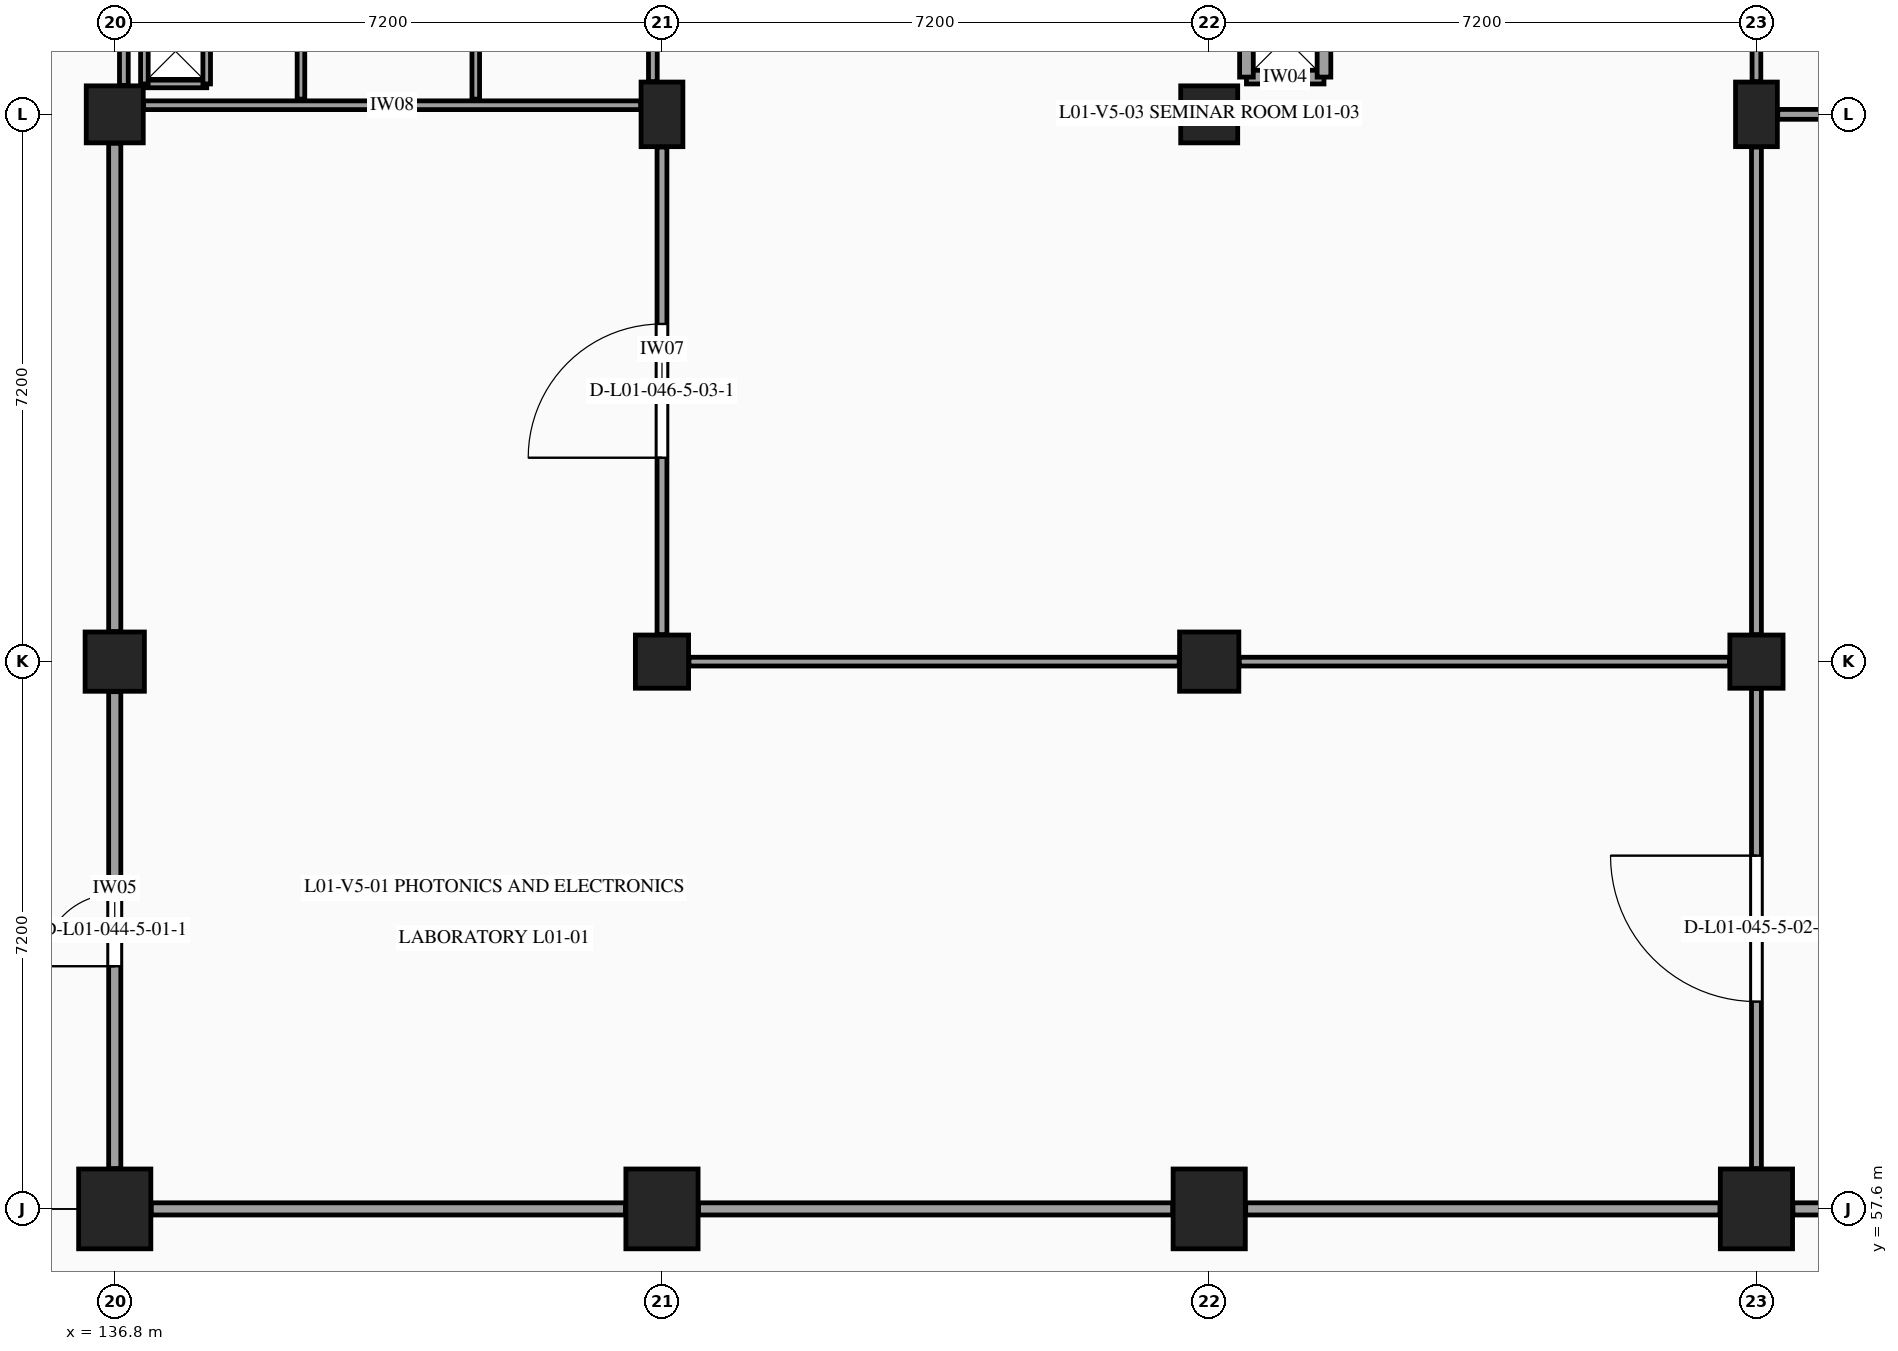
"""IFC4 building model, lengths in metres.
Left out: names, types, materials, properties, quantities, classifications, styles, units other than length and angle.
Written with IfcOpenShell. Run it as: python <this file> out.ifc"""

import sys

from ifc_helpers import new_model, si_unit, direction, frame, frame_2d, origin, origin_2d, place, context, subcontext, project, spatial, rectangle, extrude, element, fill, save


model = new_model("IFC4")
c1 = context("Model", 3, precision=1e-05, world=origin(), true_north=direction((0.0, 1.0)))
c2 = subcontext(c1, "Body", "Model", "MODEL_VIEW")
j1 = project(units=[si_unit("LENGTHUNIT", "METRE"), si_unit("PLANEANGLEUNIT", "RADIAN")], contexts=[c1])
p1 = place(None, origin())
s1 = spatial("IfcSite", under=j1, at=p1, CompositionType="ELEMENT")
p2 = place(p1, origin())
s2 = spatial("IfcBuilding", under=s1, at=p2, CompositionType="ELEMENT")
p3 = place(p2, frame((0.0, 0.0, 5.4)))
s3 = spatial("IfcBuildingStorey", under=s2, at=p3, CompositionType="ELEMENT", Elevation=5.4)
p4 = place(p3, frame((136.8, 57.6, 0.0), z_axis=(0.0, 0.0, 1.0), x_axis=(1.0, 0.0, 0.0)))
e1 = element("IfcColumn", 1, at=p4, inside=s3, PredefinedType="COLUMN", context=c2, shape_type="SweptSolid", body=[
    extrude(rectangle(XDim=0.95, YDim=1.05, at=origin_2d()), origin(), (0.0, 0.0, 1.0), 4.5),
])
p5 = place(p3, frame((136.8, 64.8, 0.0), z_axis=(0.0, 0.0, 1.0), x_axis=(1.0, 0.0, 0.0)))
e2 = element("IfcColumn", 2, at=p5, inside=s3, PredefinedType="COLUMN", context=c2, shape_type="SweptSolid", body=[
    extrude(rectangle(XDim=0.78, YDim=0.78, at=origin_2d()), origin(), (0.0, 0.0, 1.0), 4.5),
])
p6 = place(p3, frame((136.8, 72.0, 0.0), z_axis=(0.0, 0.0, 1.0), x_axis=(1.0, 0.0, 0.0)))
e3 = element("IfcColumn", 3, at=p6, inside=s3, PredefinedType="COLUMN", context=c2, shape_type="SweptSolid", body=[
    extrude(rectangle(XDim=0.75, YDim=0.75, at=origin_2d()), origin(), (0.0, 0.0, 1.0), 4.5),
])
p7 = place(p3, frame((144.0, 57.6, 0.0), z_axis=(0.0, 0.0, 1.0), x_axis=(1.0, 0.0, 0.0)))
e4 = element("IfcColumn", 4, at=p7, inside=s3, PredefinedType="COLUMN", context=c2, shape_type="SweptSolid", body=[
    extrude(rectangle(XDim=0.95, YDim=1.05, at=origin_2d()), origin(), (0.0, 0.0, 1.0), 4.5),
])
p8 = place(p3, frame((144.0, 64.8, 0.0), z_axis=(0.0, 0.0, 1.0), x_axis=(1.0, 0.0, 0.0)))
e5 = element("IfcColumn", 5, at=p8, inside=s3, PredefinedType="COLUMN", context=c2, shape_type="SweptSolid", body=[
    extrude(rectangle(XDim=0.7, YDim=0.7, at=origin_2d()), origin(), (0.0, 0.0, 1.0), 4.5),
])
p9 = place(p3, frame((144.0, 72.0, 0.0), z_axis=(0.0, 0.0, 1.0), x_axis=(1.0, 0.0, 0.0)))
e6 = element("IfcColumn", 6, at=p9, inside=s3, PredefinedType="COLUMN", context=c2, shape_type="SweptSolid", body=[
    extrude(rectangle(XDim=0.55, YDim=0.85, at=origin_2d()), origin(), (0.0, 0.0, 1.0), 4.5),
])
p10 = place(p3, frame((151.2, 57.6, 0.0), z_axis=(0.0, 0.0, 1.0), x_axis=(1.0, 0.0, 0.0)))
e7 = element("IfcColumn", 7, at=p10, inside=s3, PredefinedType="COLUMN", context=c2, shape_type="SweptSolid", body=[
    extrude(rectangle(XDim=0.95, YDim=1.05, at=origin_2d()), origin(), (0.0, 0.0, 1.0), 4.5),
])
p11 = place(p3, frame((151.2, 64.8, 0.0), z_axis=(0.0, 0.0, 1.0), x_axis=(1.0, 0.0, 0.0)))
e8 = element("IfcColumn", 8, at=p11, inside=s3, PredefinedType="COLUMN", context=c2, shape_type="SweptSolid", body=[
    extrude(rectangle(XDim=0.78, YDim=0.78, at=origin_2d()), origin(), (0.0, 0.0, 1.0), 4.5),
])
p12 = place(p3, frame((151.2, 72.0, 0.0), z_axis=(0.0, 0.0, 1.0), x_axis=(1.0, 0.0, 0.0)))
e9 = element("IfcColumn", 9, at=p12, inside=s3, PredefinedType="COLUMN", context=c2, shape_type="SweptSolid", body=[
    extrude(rectangle(XDim=0.75, YDim=0.75, at=origin_2d()), origin(), (0.0, 0.0, 1.0), 4.5),
])
p13 = place(p3, frame((158.4, 57.6, 0.0), z_axis=(0.0, 0.0, 1.0), x_axis=(1.0, 0.0, 0.0)))
e10 = element("IfcColumn", 10, at=p13, inside=s3, PredefinedType="COLUMN", context=c2, shape_type="SweptSolid", body=[
    extrude(rectangle(XDim=0.95, YDim=1.05, at=origin_2d()), origin(), (0.0, 0.0, 1.0), 4.5),
])
p14 = place(p3, frame((158.4, 64.8, 0.0), z_axis=(0.0, 0.0, 1.0), x_axis=(1.0, 0.0, 0.0)))
e11 = element("IfcColumn", 11, at=p14, inside=s3, PredefinedType="COLUMN", context=c2, shape_type="SweptSolid", body=[
    extrude(rectangle(XDim=0.7, YDim=0.7, at=origin_2d()), origin(), (0.0, 0.0, 1.0), 4.5),
])
p15 = place(p3, frame((158.4, 72.0, 0.0), z_axis=(0.0, 0.0, 1.0), x_axis=(1.0, 0.0, 0.0)))
e12 = element("IfcColumn", 12, at=p15, inside=s3, PredefinedType="COLUMN", context=c2, shape_type="SweptSolid", body=[
    extrude(rectangle(XDim=0.55, YDim=0.85, at=origin_2d()), origin(), (0.0, 0.0, 1.0), 4.5),
])
p16 = place(p3, frame((137.18, 72.12, 0.0), z_axis=(0.0, 0.0, 1.0), x_axis=(1.0, 0.0, 0.0)))
e13 = element("IfcWall", 13, at=p16, inside=s3, PredefinedType="PARTITIONING", context=c2, shape_type="SweptSolid", body=[
    extrude(rectangle(XDim=6.54, YDim=0.115, at=frame_2d((3.27, 0.0))), origin(), (0.0, 0.0, 1.0), 3.43),
])
p17 = place(p3, frame((136.92, 72.38, 0.0), z_axis=(0.0, 0.0, 1.0), x_axis=(0.0, 1.0, 0.0)))
e14 = element("IfcWall", 14, at=p17, inside=s3, PredefinedType="PARTITIONING", context=c2, shape_type="SweptSolid", body=[
    extrude(rectangle(XDim=6.455, YDim=0.115, at=frame_2d((3.228, 0.0))), origin(), (0.0, 0.0, 1.0), 3.515),
])
p18 = place(p3, frame((143.88, 72.43, 0.0), z_axis=(0.0, 0.0, 1.0), x_axis=(0.0, 1.0, 0.0)))
e15 = element("IfcWall", 15, at=p18, inside=s3, PredefinedType="PARTITIONING", context=c2, shape_type="SweptSolid", body=[
    extrude(rectangle(XDim=6.465, YDim=0.115, at=frame_2d((3.232, 0.0))), origin(), (0.0, 0.0, 1.0), 3.515),
])
for number, where, z_axis, x_axis in (
    (16, (139.25, 72.2, 0.0), (0.0, 0.0, 1.0), (0.0, 1.0, 0.0)),
    (17, (141.55, 72.2, 0.0), (0.0, 0.0, 1.0), (0.0, 1.0, 0.0)),
):
    element("IfcWall", number, at=place(p3, frame(where, z_axis=z_axis, x_axis=x_axis)), inside=s3, PredefinedType="PARTITIONING", context=c2, shape_type="SweptSolid", body=[
        extrude(rectangle(XDim=6.8, YDim=0.1, at=frame_2d((3.4, 0.0))), origin(), (0.0, 0.0, 1.0), 4.21),
    ])
for number, where, z_axis, x_axis in (
    (18, (151.69, 72.49, 0.0), (0.0, 0.0, 1.0), (1.0, 0.0, 0.0)),
    (19, (152.71, 72.49, 0.0), (0.0, 0.0, 1.0), (0.0, 1.0, 0.0)),
    (20, (151.69, 73.51, 0.0), (0.0, 0.0, 1.0), (0.0, -1.0, 0.0)),
):
    element("IfcWall", number, at=place(p3, frame(where, z_axis=z_axis, x_axis=x_axis)), inside=s3, PredefinedType="PARTITIONING", context=c2, shape_type="SweptSolid", body=[
        extrude(rectangle(XDim=1.02, YDim=0.18, at=frame_2d((0.51, 0.0))), origin(), (0.0, 0.0, 1.0), 4.21),
    ])
p19 = place(p3, frame((137.19, 72.4, 0.0), z_axis=(0.0, 0.0, 1.0), x_axis=(1.0, 0.0, 0.0)))
e21 = element("IfcWall", 21, at=p19, inside=s3, PredefinedType="PARTITIONING", context=c2, shape_type="SweptSolid", body=[
    extrude(rectangle(XDim=0.82, YDim=0.1, at=frame_2d((0.41, 0.0))), origin(), (0.0, 0.0, 1.0), 4.21),
])
for number, where, z_axis, x_axis in (
    (22, (138.01, 72.4, 0.0), (0.0, 0.0, 1.0), (0.0, 1.0, 0.0)),
    (23, (137.19, 73.26, 0.0), (0.0, 0.0, 1.0), (0.0, -1.0, 0.0)),
):
    element("IfcWall", number, at=place(p3, frame(where, z_axis=z_axis, x_axis=x_axis)), inside=s3, PredefinedType="PARTITIONING", context=c2, shape_type="SweptSolid", body=[
        extrude(rectangle(XDim=0.86, YDim=0.1, at=frame_2d((0.43, 0.0))), origin(), (0.0, 0.0, 1.0), 4.21),
    ])
p20 = place(p3, frame((136.8, 58.13, 0.0), z_axis=(0.0, 0.0, 1.0), x_axis=(0.0, 1.0, 0.0)))
e24 = element("IfcWall", 24, at=p20, inside=s3, PredefinedType="PARTITIONING", context=c2, shape_type="SweptSolid", body=[
    extrude(rectangle(XDim=6.275, YDim=0.16, at=frame_2d((3.138, 0.0))), origin(), (0.0, 0.0, 1.0), 3.525),
])
p21 = place(p20, frame((2.663, 0.0, 0.0)))
e25 = element("IfcOpeningElement", 25, at=p21, cuts=e24, PredefinedType="OPENING", context=c2, shape_type="SweptSolid", body=[
    extrude(rectangle(XDim=0.95, YDim=2.15, at=frame_2d((0.475, 1.075))), frame((0.0, 0.09, 0.0), z_axis=(0.0, -1.0, 0.0), x_axis=(1.0, 0.0, 0.0)), (0.0, 0.0, 1.0), 0.18),
])
p22 = place(p3, frame((136.8, 65.195, 0.0), z_axis=(0.0, 0.0, 1.0), x_axis=(0.0, 1.0, 0.0)))
e26 = element("IfcWall", 26, at=p22, inside=s3, PredefinedType="PARTITIONING", context=c2, shape_type="SweptSolid", body=[
    extrude(rectangle(XDim=6.425, YDim=0.16, at=frame_2d((3.212, 0.0))), origin(), (0.0, 0.0, 1.0), 3.52),
])
p23 = place(p3, frame((137.28, 57.6, 0.0), z_axis=(0.0, 0.0, 1.0), x_axis=(1.0, 0.0, 0.0)))
e27 = element("IfcWall", 27, at=p23, inside=s3, PredefinedType="PARTITIONING", context=c2, shape_type="SweptSolid", body=[
    extrude(rectangle(XDim=6.24, YDim=0.16, at=frame_2d((3.12, 0.0))), origin(), (0.0, 0.0, 1.0), 3.43),
])
p24 = place(p3, frame((144.0, 65.155, 0.0), z_axis=(0.0, 0.0, 1.0), x_axis=(0.0, 1.0, 0.0)))
e28 = element("IfcWall", 28, at=p24, inside=s3, PredefinedType="PARTITIONING", context=c2, shape_type="SweptSolid", body=[
    extrude(rectangle(XDim=6.415, YDim=0.13, at=frame_2d((3.208, 0.0))), origin(), (0.0, 0.0, 1.0), 3.52),
])
p25 = place(p24, frame((2.327, 0.0, 0.0)))
e29 = element("IfcOpeningElement", 29, at=p25, cuts=e28, PredefinedType="OPENING", context=c2, shape_type="SweptSolid", body=[
    extrude(rectangle(XDim=1.76, YDim=2.3, at=frame_2d((0.88, 1.15))), frame((0.0, 0.075, 0.0), z_axis=(0.0, -1.0, 0.0), x_axis=(1.0, 0.0, 0.0)), (0.0, 0.0, 1.0), 0.15),
])
p26 = place(p3, frame((144.48, 57.6, 0.0), z_axis=(0.0, 0.0, 1.0), x_axis=(1.0, 0.0, 0.0)))
e30 = element("IfcWall", 30, at=p26, inside=s3, PredefinedType="PARTITIONING", context=c2, shape_type="SweptSolid", body=[
    extrude(rectangle(XDim=6.24, YDim=0.16, at=frame_2d((3.12, 0.0))), origin(), (0.0, 0.0, 1.0), 3.46),
])
p27 = place(p3, frame((144.355, 64.8, 0.0), z_axis=(0.0, 0.0, 1.0), x_axis=(1.0, 0.0, 0.0)))
e31 = element("IfcWall", 31, at=p27, inside=s3, PredefinedType="PARTITIONING", context=c2, shape_type="SweptSolid", body=[
    extrude(rectangle(XDim=6.45, YDim=0.115, at=frame_2d((3.225, 0.0))), origin(), (0.0, 0.0, 1.0), 3.46),
])
p28 = place(p3, frame((151.68, 57.6, 0.0), z_axis=(0.0, 0.0, 1.0), x_axis=(1.0, 0.0, 0.0)))
e32 = element("IfcWall", 32, at=p28, inside=s3, PredefinedType="PARTITIONING", context=c2, shape_type="SweptSolid", body=[
    extrude(rectangle(XDim=6.24, YDim=0.16, at=frame_2d((3.12, 0.0))), origin(), (0.0, 0.0, 1.0), 3.47),
])
p29 = place(p3, frame((158.4, 58.13, 0.0), z_axis=(0.0, 0.0, 1.0), x_axis=(0.0, 1.0, 0.0)))
e33 = element("IfcWall", 33, at=p29, inside=s3, PredefinedType="PARTITIONING", context=c2, shape_type="SweptSolid", body=[
    extrude(rectangle(XDim=6.315, YDim=0.13, at=frame_2d((3.158, 0.0))), origin(), (0.0, 0.0, 1.0), 3.525),
])
p30 = place(p29, frame((2.198, 0.0, 0.0)))
e34 = element("IfcOpeningElement", 34, at=p30, cuts=e33, PredefinedType="OPENING", context=c2, shape_type="SweptSolid", body=[
    extrude(rectangle(XDim=1.92, YDim=2.35, at=frame_2d((0.96, 1.175))), frame((0.0, 0.075, 0.0), z_axis=(0.0, -1.0, 0.0), x_axis=(1.0, 0.0, 0.0)), (0.0, 0.0, 1.0), 0.15),
])
p31 = place(p3, frame((151.595, 64.8, 0.0), z_axis=(0.0, 0.0, 1.0), x_axis=(1.0, 0.0, 0.0)))
e35 = element("IfcWall", 35, at=p31, inside=s3, PredefinedType="PARTITIONING", context=c2, shape_type="SweptSolid", body=[
    extrude(rectangle(XDim=6.45, YDim=0.115, at=frame_2d((3.225, 0.0))), origin(), (0.0, 0.0, 1.0), 3.47),
])
p32 = place(p3, frame((158.4, 65.155, 0.0), z_axis=(0.0, 0.0, 1.0), x_axis=(0.0, 1.0, 0.0)))
e36 = element("IfcWall", 36, at=p32, inside=s3, PredefinedType="PARTITIONING", context=c2, shape_type="SweptSolid", body=[
    extrude(rectangle(XDim=6.415, YDim=0.13, at=frame_2d((3.208, 0.0))), origin(), (0.0, 0.0, 1.0), 3.52),
])
p33 = place(p3, frame((158.4, 72.43, 0.0), z_axis=(0.0, 0.0, 1.0), x_axis=(0.0, 1.0, 0.0)))
e37 = element("IfcWall", 37, at=p33, inside=s3, PredefinedType="PARTITIONING", context=c2, shape_type="SweptSolid", body=[
    extrude(rectangle(XDim=6.465, YDim=0.115, at=frame_2d((3.232, 0.0))), origin(), (0.0, 0.0, 1.0), 3.515),
])
p34 = place(p33, frame((2.452, 0.0, 0.0)))
e38 = element("IfcOpeningElement", 38, at=p34, cuts=e37, PredefinedType="OPENING", context=c2, shape_type="SweptSolid", body=[
    extrude(rectangle(XDim=1.56, YDim=2.25, at=frame_2d((0.78, 1.125))), frame((0.0, 0.067, 0.0), z_axis=(0.0, -1.0, 0.0), x_axis=(1.0, 0.0, 0.0)), (0.0, 0.0, 1.0), 0.135),
])
p35 = place(p3, frame((158.88, 57.6, 0.0), z_axis=(0.0, 0.0, 1.0), x_axis=(1.0, 0.0, 0.0)))
e39 = element("IfcWall", 39, at=p35, inside=s3, PredefinedType="PARTITIONING", context=c2, shape_type="SweptSolid", body=[
    extrude(rectangle(XDim=6.24, YDim=0.16, at=frame_2d((3.12, 0.0))), origin(), (0.0, 0.0, 1.0), 3.485),
])
p36 = place(p3, frame((158.68, 72.0, 0.0), z_axis=(0.0, 0.0, 1.0), x_axis=(1.0, 0.0, 0.0)))
e40 = element("IfcWall", 40, at=p36, inside=s3, PredefinedType="PARTITIONING", context=c2, shape_type="SweptSolid", body=[
    extrude(rectangle(XDim=6.54, YDim=0.13, at=frame_2d((3.27, 0.0))), origin(), (0.0, 0.0, 1.0), 3.485),
])
p37 = place(p21, origin())
e41 = element("IfcDoor", 41, at=p37, inside=s3, OperationType="SINGLE_SWING_LEFT", PredefinedType="DOOR", context=c2, shape_type="SweptSolid", body=[
    extrude(rectangle(XDim=0.95, YDim=2.15, at=frame_2d((0.475, 1.075))), frame((0.0, 0.025, 0.0), z_axis=(0.0, -1.0, 0.0), x_axis=(1.0, 0.0, 0.0)), (0.0, 0.0, 1.0), 0.05),
])
fill(e25, e41)
p38 = place(p30, origin())
e42 = element("IfcDoor", 42, at=p38, inside=s3, OperationType="SINGLE_SWING_RIGHT", PredefinedType="DOOR", context=c2, shape_type="SweptSolid", body=[
    extrude(rectangle(XDim=1.92, YDim=2.35, at=frame_2d((0.96, 1.175))), frame((0.0, 0.025, 0.0), z_axis=(0.0, -1.0, 0.0), x_axis=(1.0, 0.0, 0.0)), (0.0, 0.0, 1.0), 0.05),
])
fill(e34, e42)
p39 = place(p25, origin())
e43 = element("IfcDoor", 43, at=p39, inside=s3, OperationType="SINGLE_SWING_LEFT", PredefinedType="DOOR", context=c2, shape_type="SweptSolid", body=[
    extrude(rectangle(XDim=1.76, YDim=2.3, at=frame_2d((0.88, 1.15))), frame((0.0, 0.025, 0.0), z_axis=(0.0, -1.0, 0.0), x_axis=(1.0, 0.0, 0.0)), (0.0, 0.0, 1.0), 0.05),
])
fill(e29, e43)
save(model, sys.argv[1])
